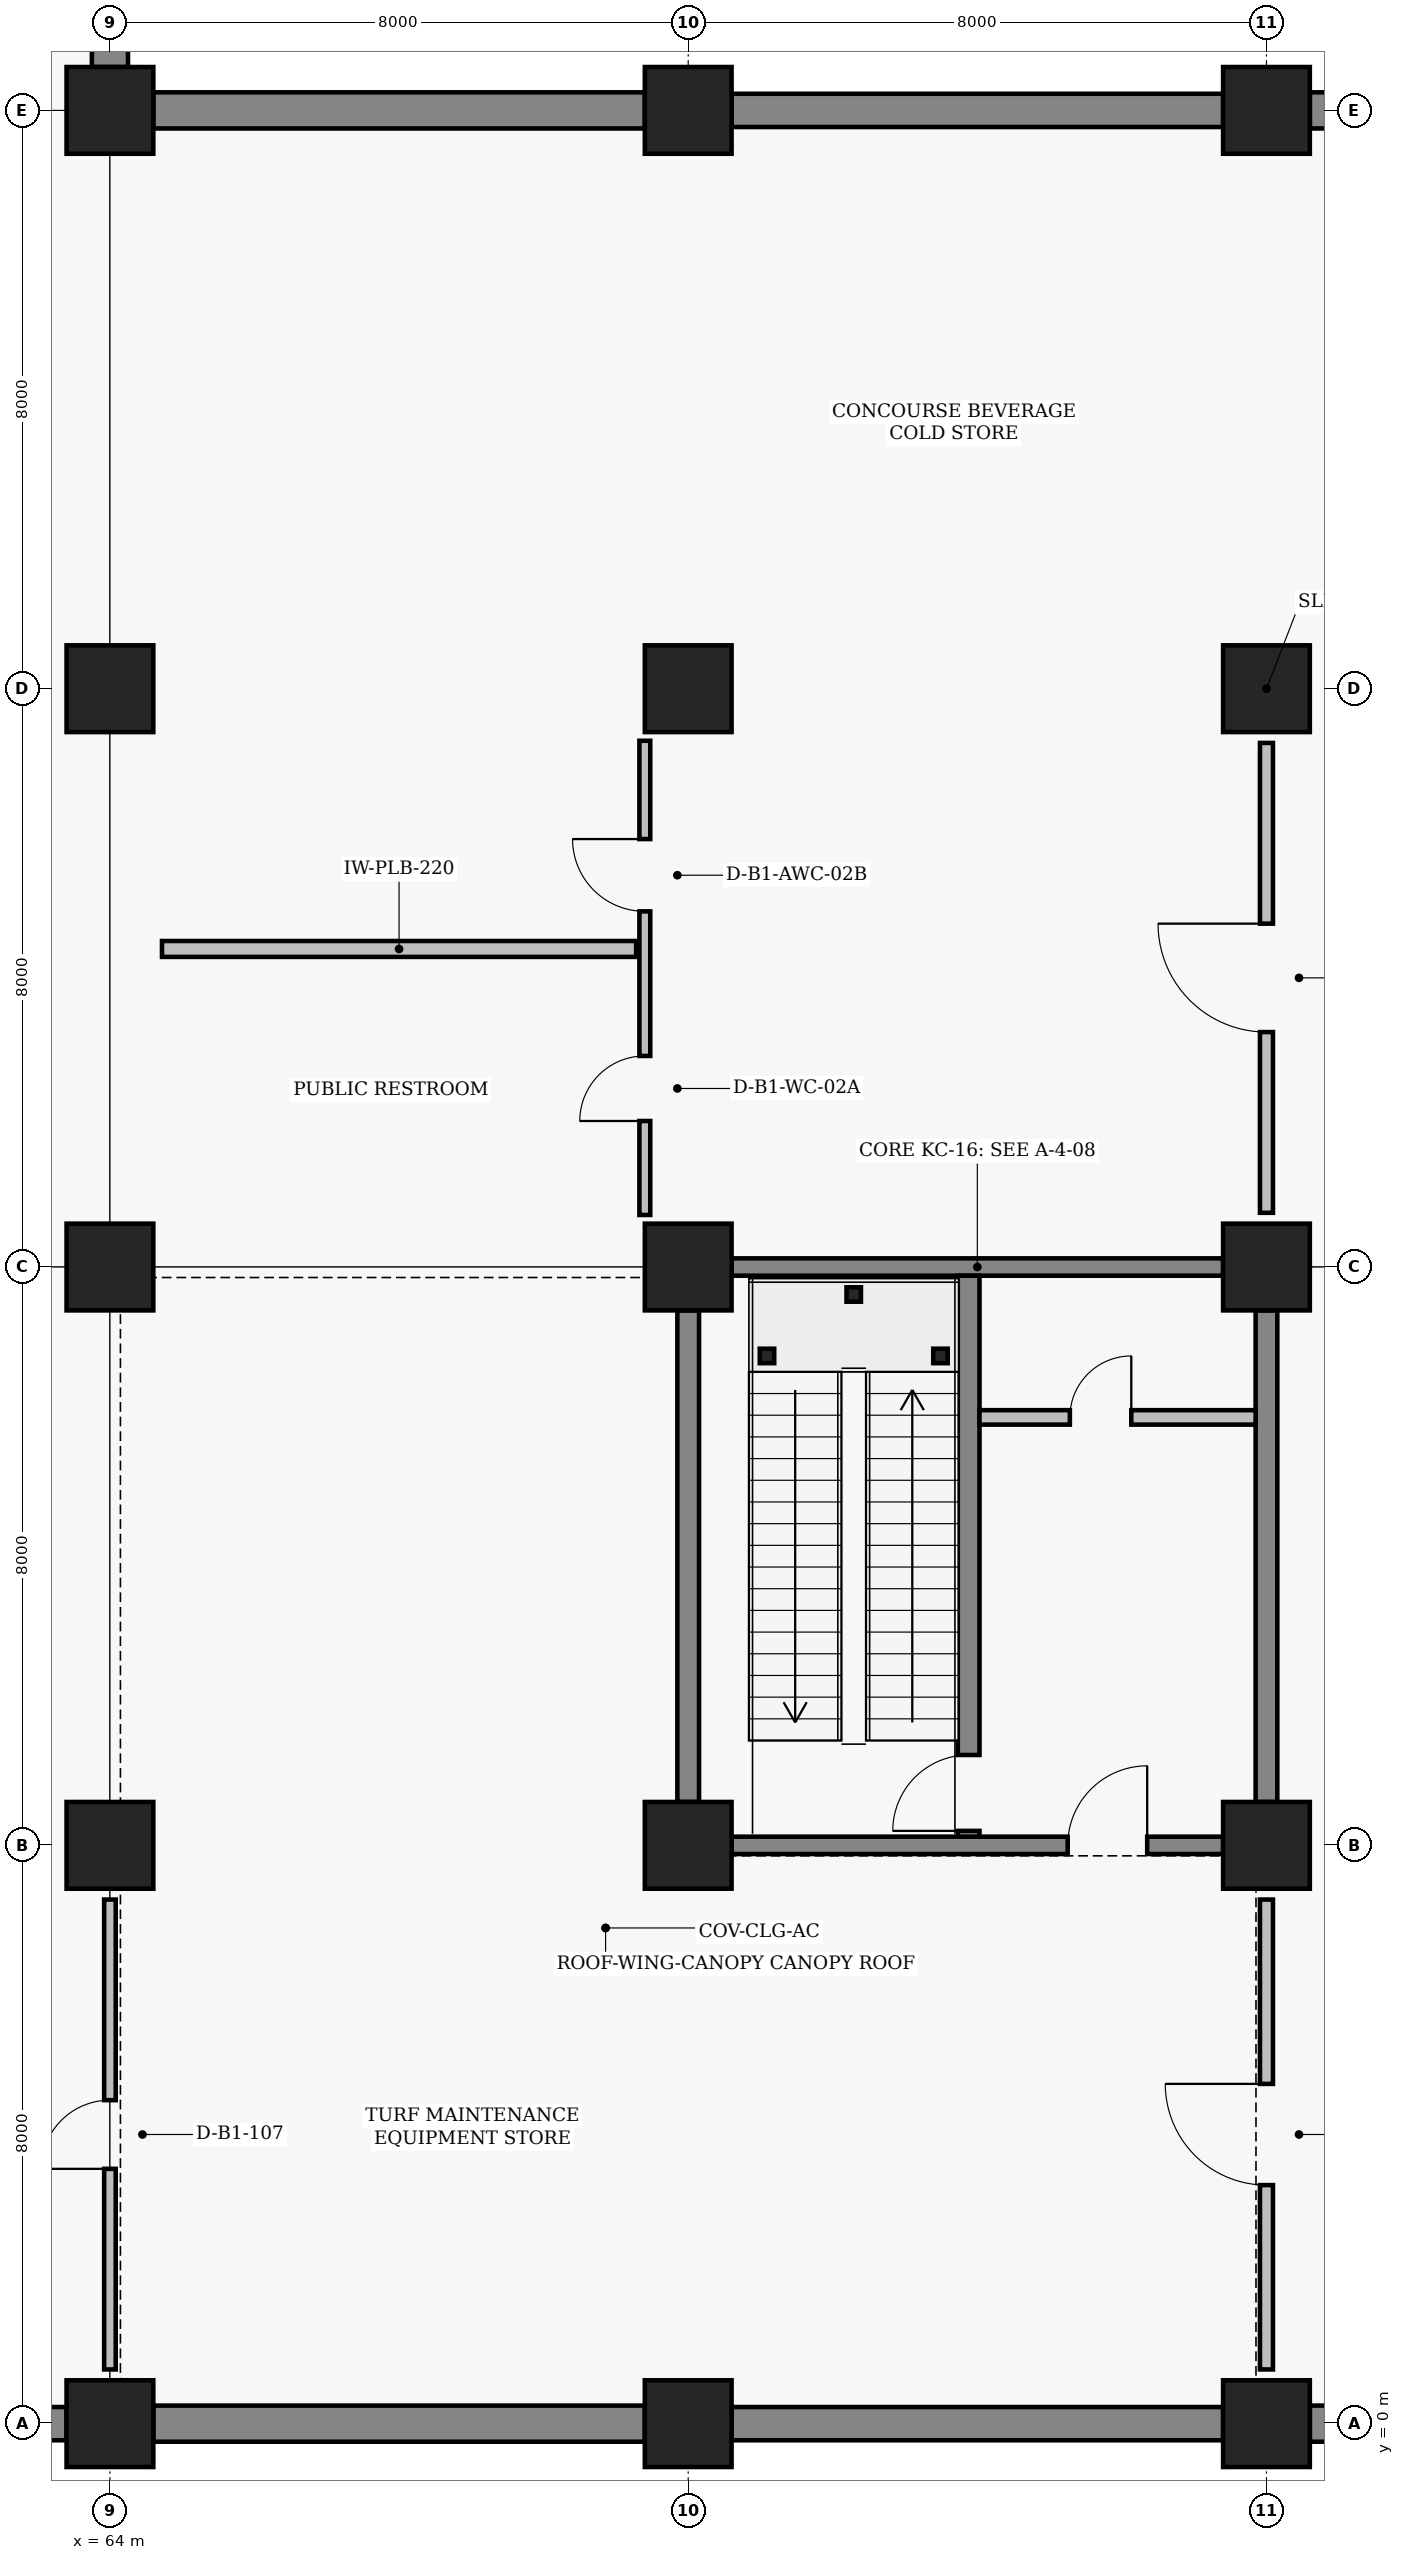
"""IFC4 building model, lengths in metres.
Left out: names, types, materials, properties, quantities, classifications, styles, units other than length and angle.
Written with IfcOpenShell. Run it as: python <this file> out.ifc"""

import sys

from ifc_helpers import new_model, si_unit, direction, frame, frame_2d, origin, origin_2d, place, context, subcontext, project, spatial, rectangle, hollow_rectangle, extrude, element, fill, save


model = new_model("IFC4")
c1 = context("Model", 3, precision=1e-05, world=origin(), true_north=direction((0.0, 1.0)))
c2 = subcontext(c1, "Body", "Model", "MODEL_VIEW")
j1 = project(units=[si_unit("LENGTHUNIT", "METRE"), si_unit("PLANEANGLEUNIT", "RADIAN")], contexts=[c1])
p1 = place(None, origin())
s1 = spatial("IfcSite", under=j1, at=p1, CompositionType="ELEMENT")
p2 = place(p1, origin())
s2 = spatial("IfcBuilding", under=s1, at=p2, CompositionType="ELEMENT")
p3 = place(p2, frame((0.0, 0.0, -5.4)))
s3 = spatial("IfcBuildingStorey", under=s2, at=p3, CompositionType="ELEMENT", Elevation=-5.4)
for number, where, z_axis, x_axis in (
    (1, (64.0, 0.0, 0.0), (0.0, 0.0, 1.0), (1.0, 0.0, 0.0)),
    (2, (64.0, 8.0, 0.0), (0.0, 0.0, 1.0), (1.0, 0.0, 0.0)),
    (3, (64.0, 16.0, 0.0), (0.0, 0.0, 1.0), (1.0, 0.0, 0.0)),
    (4, (64.0, 24.0, 0.0), (0.0, 0.0, 1.0), (1.0, 0.0, 0.0)),
    (5, (64.0, 32.0, 0.0), (0.0, 0.0, 1.0), (1.0, 0.0, 0.0)),
    (6, (72.0, 0.0, 0.0), (0.0, 0.0, 1.0), (1.0, 0.0, 0.0)),
    (7, (72.0, 8.0, 0.0), (0.0, 0.0, 1.0), (1.0, 0.0, 0.0)),
    (8, (72.0, 16.0, 0.0), (0.0, 0.0, 1.0), (1.0, 0.0, 0.0)),
    (9, (72.0, 24.0, 0.0), (0.0, 0.0, 1.0), (1.0, 0.0, 0.0)),
    (10, (72.0, 32.0, 0.0), (0.0, 0.0, 1.0), (1.0, 0.0, 0.0)),
    (11, (80.0, 0.0, 0.0), (0.0, 0.0, 1.0), (1.0, 0.0, 0.0)),
    (12, (80.0, 8.0, 0.0), (0.0, 0.0, 1.0), (1.0, 0.0, 0.0)),
    (13, (80.0, 16.0, 0.0), (0.0, 0.0, 1.0), (1.0, 0.0, 0.0)),
    (14, (80.0, 24.0, 0.0), (0.0, 0.0, 1.0), (1.0, 0.0, 0.0)),
    (15, (80.0, 32.0, 0.0), (0.0, 0.0, 1.0), (1.0, 0.0, 0.0)),
):
    element("IfcColumn", number, at=place(p3, frame(where, z_axis=z_axis, x_axis=x_axis)), inside=s3, PredefinedType="COLUMN", context=c2, shape_type="SweptSolid", body=[
        extrude(rectangle(XDim=1.2, YDim=1.2, at=origin_2d()), origin(), (0.0, 0.0, 1.0), 5.4),
    ])
p4 = place(p3, frame((56.6, 0.0, 0.0), z_axis=(0.0, 0.0, 1.0), x_axis=(1.0, 0.0, 0.0)))
e16 = element("IfcWall", 16, at=p4, inside=s3, PredefinedType="STANDARD", context=c2, shape_type="SweptSolid", body=[
    extrude(rectangle(XDim=6.8, YDim=0.46, at=frame_2d((3.4, 0.0))), origin(), (0.0, 0.0, 1.0), 4.29),
])
p5 = place(p3, frame((64.0, 32.6, 0.0), z_axis=(0.0, 0.0, 1.0), x_axis=(0.0, 1.0, 0.0)))
e17 = element("IfcWall", 17, at=p5, inside=s3, PredefinedType="STANDARD", context=c2, shape_type="SweptSolid", body=[
    extrude(rectangle(XDim=6.8, YDim=0.5, at=frame_2d((3.4, 0.0))), origin(), (0.0, 0.0, 1.0), 4.24),
])
p6 = place(p3, frame((64.6, 0.0, 0.0), z_axis=(0.0, 0.0, 1.0), x_axis=(1.0, 0.0, 0.0)))
e18 = element("IfcWall", 18, at=p6, inside=s3, PredefinedType="STANDARD", context=c2, shape_type="SweptSolid", body=[
    extrude(rectangle(XDim=6.8, YDim=0.5, at=frame_2d((3.4, 0.0))), origin(), (0.0, 0.0, 1.0), 4.29),
])
p7 = place(p3, frame((64.6, 32.0, 0.0), z_axis=(0.0, 0.0, 1.0), x_axis=(1.0, 0.0, 0.0)))
e19 = element("IfcWall", 19, at=p7, inside=s3, PredefinedType="STANDARD", context=c2, shape_type="SweptSolid", body=[
    extrude(rectangle(XDim=6.8, YDim=0.5, at=frame_2d((3.4, 0.0))), origin(), (0.0, 0.0, 1.0), 4.24),
])
p8 = place(p3, frame((72.6, 0.0, 0.0), z_axis=(0.0, 0.0, 1.0), x_axis=(1.0, 0.0, 0.0)))
e20 = element("IfcWall", 20, at=p8, inside=s3, PredefinedType="STANDARD", context=c2, shape_type="SweptSolid", body=[
    extrude(rectangle(XDim=6.8, YDim=0.46, at=frame_2d((3.4, 0.0))), origin(), (0.0, 0.0, 1.0), 4.29),
])
p9 = place(p3, frame((72.6, 32.0, 0.0), z_axis=(0.0, 0.0, 1.0), x_axis=(1.0, 0.0, 0.0)))
e21 = element("IfcWall", 21, at=p9, inside=s3, PredefinedType="STANDARD", context=c2, shape_type="SweptSolid", body=[
    extrude(rectangle(XDim=6.8, YDim=0.46, at=frame_2d((3.4, 0.0))), origin(), (0.0, 0.0, 1.0), 4.34),
])
p10 = place(p3, frame((80.6, 0.0, 0.0), z_axis=(0.0, 0.0, 1.0), x_axis=(1.0, 0.0, 0.0)))
e22 = element("IfcWall", 22, at=p10, inside=s3, PredefinedType="STANDARD", context=c2, shape_type="SweptSolid", body=[
    extrude(rectangle(XDim=6.8, YDim=0.5, at=frame_2d((3.4, 0.0))), origin(), (0.0, 0.0, 1.0), 4.29),
])
p11 = place(p3, frame((80.6, 32.0, 0.0), z_axis=(0.0, 0.0, 1.0), x_axis=(1.0, 0.0, 0.0)))
e23 = element("IfcWall", 23, at=p11, inside=s3, PredefinedType="STANDARD", context=c2, shape_type="SweptSolid", body=[
    extrude(rectangle(XDim=6.8, YDim=0.5, at=frame_2d((3.4, 0.0))), origin(), (0.0, 0.0, 1.0), 4.34),
])
p12 = place(p3, frame((72.6, 8.0, 0.0), z_axis=(0.0, 0.0, 1.0), x_axis=(1.0, 0.0, 0.0)))
e24 = element("IfcWall", 24, at=p12, inside=s3, PredefinedType="SHEAR", context=c2, shape_type="SweptSolid", body=[
    extrude(rectangle(XDim=6.8, YDim=0.24, at=frame_2d((3.4, 0.0))), origin(), (0.0, 0.0, 1.0), 4.54),
])
p13 = place(p12, frame((4.65, 0.0, 0.0)))
e25 = element("IfcOpeningElement", 25, at=p13, cuts=e24, PredefinedType="OPENING", context=c2, shape_type="SweptSolid", body=[
    extrude(rectangle(XDim=1.1, YDim=2.2, at=frame_2d((0.55, 1.1))), frame((0.0, 0.13, 0.0), z_axis=(0.0, -1.0, 0.0), x_axis=(1.0, 0.0, 0.0)), (0.0, 0.0, 1.0), 0.26),
])
p14 = place(p3, frame((72.6, 16.0, 0.0), z_axis=(0.0, 0.0, 1.0), x_axis=(1.0, 0.0, 0.0)))
e26 = element("IfcWall", 26, at=p14, inside=s3, PredefinedType="SHEAR", context=c2, shape_type="SweptSolid", body=[
    extrude(rectangle(XDim=6.8, YDim=0.24, at=frame_2d((3.4, 0.0))), origin(), (0.0, 0.0, 1.0), 4.54),
])
for number, where, z_axis, x_axis in (
    (27, (72.0, 8.6, 0.0), (0.0, 0.0, 1.0), (0.0, 1.0, 0.0)),
    (28, (80.0, 8.6, 0.0), (0.0, 0.0, 1.0), (0.0, 1.0, 0.0)),
):
    element("IfcWall", number, at=place(p3, frame(where, z_axis=z_axis, x_axis=x_axis)), inside=s3, PredefinedType="SHEAR", context=c2, shape_type="SweptSolid", body=[
        extrude(rectangle(XDim=6.8, YDim=0.3, at=frame_2d((3.4, 0.0))), origin(), (0.0, 0.0, 1.0), 4.34),
    ])
p15 = place(p3, frame((75.88, 8.12, 0.0), z_axis=(0.0, 0.0, 1.0), x_axis=(0.0, 1.0, 0.0)))
e29 = element("IfcWall", 29, at=p15, inside=s3, PredefinedType="SHEAR", context=c2, shape_type="SweptSolid", body=[
    extrude(rectangle(XDim=7.76, YDim=0.3, at=frame_2d((3.88, 0.0))), origin(), (0.0, 0.0, 1.0), 4.54),
])
p16 = place(p15, frame((0.08, 0.0, 0.0)))
e30 = element("IfcOpeningElement", 30, at=p16, cuts=e29, PredefinedType="OPENING", context=c2, shape_type="SweptSolid", body=[
    extrude(rectangle(XDim=1.05, YDim=2.15, at=frame_2d((0.525, 1.075))), frame((0.0, 0.16, 0.0), z_axis=(0.0, -1.0, 0.0), x_axis=(1.0, 0.0, 0.0)), (0.0, 0.0, 1.0), 0.32),
])
p17 = place(p3, frame((76.03, 13.92, 0.0), z_axis=(0.0, 0.0, 1.0), x_axis=(1.0, 0.0, 0.0)))
e31 = element("IfcWall", 31, at=p17, inside=s3, PredefinedType="PARTITIONING", context=c2, shape_type="SweptSolid", body=[
    extrude(rectangle(XDim=3.82, YDim=0.2, at=frame_2d((1.91, 0.0))), origin(), (0.0, 0.0, 1.0), 4.34),
])
p18 = place(p17, frame((1.25, 0.0, 0.0)))
e32 = element("IfcOpeningElement", 32, at=p18, cuts=e31, PredefinedType="OPENING", context=c2, shape_type="SweptSolid", body=[
    extrude(rectangle(XDim=0.85, YDim=2.05, at=frame_2d((0.425, 1.025))), frame((0.0, 0.11, 0.0), z_axis=(0.0, -1.0, 0.0), x_axis=(1.0, 0.0, 0.0)), (0.0, 0.0, 1.0), 0.22),
])
for number, where, z_axis, x_axis in (
    (33, (73.09, 14.77, 0.0), (0.0, 0.0, 1.0), (1.0, 0.0, 0.0)),
    (34, (75.49, 14.77, 0.0), (0.0, 0.0, 1.0), (1.0, 0.0, 0.0)),
    (35, (74.29, 15.62, 0.0), (0.0, 0.0, 1.0), (1.0, 0.0, 0.0)),
):
    element("IfcColumn", number, at=place(p3, frame(where, z_axis=z_axis, x_axis=x_axis)), inside=s3, PredefinedType="COLUMN", context=c2, shape_type="SweptSolid", body=[
        extrude(hollow_rectangle(XDim=0.2, YDim=0.2, WallThickness=0.009, at=origin_2d()), origin(), (0.0, 0.0, 1.0), 2.5),
    ])
p19 = place(p3, frame((64.72, 20.4, 0.0), z_axis=(0.0, 0.0, 1.0), x_axis=(1.0, 0.0, 0.0)))
e36 = element("IfcWall", 36, at=p19, inside=s3, PredefinedType="PLUMBINGWALL", context=c2, shape_type="SweptSolid", body=[
    extrude(rectangle(XDim=6.56, YDim=0.22, at=frame_2d((3.28, 0.0))), origin(), (0.0, 0.0, 1.0), 4.69),
])
p20 = place(p3, frame((71.4, 16.72, 0.0), z_axis=(0.0, 0.0, 1.0), x_axis=(0.0, 1.0, 0.0)))
e37 = element("IfcWall", 37, at=p20, inside=s3, PredefinedType="PARTITIONING", context=c2, shape_type="SweptSolid", body=[
    extrude(rectangle(XDim=6.56, YDim=0.15, at=frame_2d((3.28, 0.0))), origin(), (0.0, 0.0, 1.0), 4.69),
])
p21 = place(p20, frame((1.3, 0.0, 0.0)))
e38 = element("IfcOpeningElement", 38, at=p21, cuts=e37, PredefinedType="OPENING", context=c2, shape_type="SweptSolid", body=[
    extrude(rectangle(XDim=0.9, YDim=2.1, at=frame_2d((0.45, 1.05))), frame((0.0, 0.085, 0.0), z_axis=(0.0, -1.0, 0.0), x_axis=(1.0, 0.0, 0.0)), (0.0, 0.0, 1.0), 0.17),
])
p22 = place(p20, frame((4.2, 0.0, 0.0)))
e39 = element("IfcOpeningElement", 39, at=p22, cuts=e37, PredefinedType="OPENING", context=c2, shape_type="SweptSolid", body=[
    extrude(rectangle(XDim=1.0, YDim=2.15, at=frame_2d((0.5, 1.075))), frame((0.0, 0.085, 0.0), z_axis=(0.0, -1.0, 0.0), x_axis=(1.0, 0.0, 0.0)), (0.0, 0.0, 1.0), 0.17),
])
p23 = place(p3, frame((80.0, 16.75, 0.0), z_axis=(0.0, 0.0, 1.0), x_axis=(0.0, 1.0, 0.0)))
e40 = element("IfcWall", 40, at=p23, inside=s3, PredefinedType="PARTITIONING", context=c2, shape_type="SweptSolid", body=[
    extrude(rectangle(XDim=6.5, YDim=0.18, at=frame_2d((3.25, 0.0))), origin(), (0.0, 0.0, 1.0), 4.39),
])
p24 = place(p23, frame((2.5, 0.0, 0.0)))
e41 = element("IfcOpeningElement", 41, at=p24, cuts=e40, PredefinedType="OPENING", context=c2, shape_type="SweptSolid", body=[
    extrude(rectangle(XDim=1.5, YDim=2.2, at=frame_2d((0.75, 1.1))), frame((0.0, 0.1, 0.0), z_axis=(0.0, -1.0, 0.0), x_axis=(1.0, 0.0, 0.0)), (0.0, 0.0, 1.0), 0.2),
])
p25 = place(p3, frame((64.0, 0.75, 0.0), z_axis=(0.0, 0.0, 1.0), x_axis=(0.0, 1.0, 0.0)))
e42 = element("IfcWall", 42, at=p25, inside=s3, PredefinedType="PARTITIONING", context=c2, shape_type="SweptSolid", body=[
    extrude(rectangle(XDim=6.5, YDim=0.16, at=frame_2d((3.25, 0.0))), origin(), (0.0, 0.0, 1.0), 4.34),
])
p26 = place(p25, frame((2.775, 0.0, 0.0)))
e43 = element("IfcOpeningElement", 43, at=p26, cuts=e42, PredefinedType="OPENING", context=c2, shape_type="SweptSolid", body=[
    extrude(rectangle(XDim=0.95, YDim=2.1, at=frame_2d((0.475, 1.05))), frame((0.0, 0.09, 0.0), z_axis=(0.0, -1.0, 0.0), x_axis=(1.0, 0.0, 0.0)), (0.0, 0.0, 1.0), 0.18),
])
p27 = place(p3, frame((80.0, 0.75, 0.0), z_axis=(0.0, 0.0, 1.0), x_axis=(0.0, 1.0, 0.0)))
e44 = element("IfcWall", 44, at=p27, inside=s3, PredefinedType="PARTITIONING", context=c2, shape_type="SweptSolid", body=[
    extrude(rectangle(XDim=6.5, YDim=0.18, at=frame_2d((3.25, 0.0))), origin(), (0.0, 0.0, 1.0), 4.34),
])
p28 = place(p27, frame((2.55, 0.0, 0.0)))
e45 = element("IfcOpeningElement", 45, at=p28, cuts=e44, PredefinedType="OPENING", context=c2, shape_type="SweptSolid", body=[
    extrude(rectangle(XDim=1.4, YDim=2.2, at=frame_2d((0.7, 1.1))), frame((0.0, 0.1, 0.0), z_axis=(0.0, -1.0, 0.0), x_axis=(1.0, 0.0, 0.0)), (0.0, 0.0, 1.0), 0.2),
])
p29 = place(p13, origin())
e46 = element("IfcDoor", 46, at=p29, inside=s3, OperationType="SINGLE_SWING_RIGHT", PredefinedType="DOOR", context=c2, shape_type="SweptSolid", body=[
    extrude(rectangle(XDim=1.1, YDim=2.2, at=frame_2d((0.55, 1.1))), frame((0.0, 0.025, 0.0), z_axis=(0.0, -1.0, 0.0), x_axis=(1.0, 0.0, 0.0)), (0.0, 0.0, 1.0), 0.05),
])
fill(e25, e46)
p30 = place(p16, origin())
e47 = element("IfcDoor", 47, at=p30, inside=s3, OperationType="SINGLE_SWING_LEFT", PredefinedType="DOOR", context=c2, shape_type="SweptSolid", body=[
    extrude(rectangle(XDim=1.05, YDim=2.15, at=frame_2d((0.525, 1.075))), frame((0.0, 0.025, 0.0), z_axis=(0.0, -1.0, 0.0), x_axis=(1.0, 0.0, 0.0)), (0.0, 0.0, 1.0), 0.05),
])
fill(e30, e47)
p31 = place(p18, origin())
e48 = element("IfcDoor", 48, at=p31, inside=s3, OperationType="SINGLE_SWING_RIGHT", PredefinedType="TRAPDOOR", context=c2, shape_type="SweptSolid", body=[
    extrude(rectangle(XDim=0.85, YDim=2.05, at=frame_2d((0.425, 1.025))), frame((0.0, 0.025, 0.0), z_axis=(0.0, -1.0, 0.0), x_axis=(1.0, 0.0, 0.0)), (0.0, 0.0, 1.0), 0.05),
])
fill(e32, e48)
p32 = place(p21, origin())
e49 = element("IfcDoor", 49, at=p32, inside=s3, OperationType="SINGLE_SWING_LEFT", PredefinedType="DOOR", context=c2, shape_type="SweptSolid", body=[
    extrude(rectangle(XDim=0.9, YDim=2.1, at=frame_2d((0.45, 1.05))), frame((0.0, 0.025, 0.0), z_axis=(0.0, -1.0, 0.0), x_axis=(1.0, 0.0, 0.0)), (0.0, 0.0, 1.0), 0.05),
])
fill(e38, e49)
p33 = place(p22, origin())
e50 = element("IfcDoor", 50, at=p33, inside=s3, OperationType="SINGLE_SWING_RIGHT", PredefinedType="DOOR", context=c2, shape_type="SweptSolid", body=[
    extrude(rectangle(XDim=1.0, YDim=2.15, at=frame_2d((0.5, 1.075))), frame((0.0, 0.025, 0.0), z_axis=(0.0, -1.0, 0.0), x_axis=(1.0, 0.0, 0.0)), (0.0, 0.0, 1.0), 0.05),
])
fill(e39, e50)
p34 = place(p24, origin())
e51 = element("IfcDoor", 51, at=p34, inside=s3, OperationType="SINGLE_SWING_RIGHT", PredefinedType="DOOR", context=c2, shape_type="SweptSolid", body=[
    extrude(rectangle(XDim=1.5, YDim=2.2, at=frame_2d((0.75, 1.1))), frame((0.0, 0.025, 0.0), z_axis=(0.0, -1.0, 0.0), x_axis=(1.0, 0.0, 0.0)), (0.0, 0.0, 1.0), 0.05),
])
fill(e41, e51)
p35 = place(p26, origin())
e52 = element("IfcDoor", 52, at=p35, inside=s3, OperationType="SINGLE_SWING_LEFT", PredefinedType="DOOR", context=c2, shape_type="SweptSolid", body=[
    extrude(rectangle(XDim=0.95, YDim=2.1, at=frame_2d((0.475, 1.05))), frame((0.0, 0.025, 0.0), z_axis=(0.0, -1.0, 0.0), x_axis=(1.0, 0.0, 0.0)), (0.0, 0.0, 1.0), 0.05),
])
fill(e43, e52)
p36 = place(p28, origin())
e53 = element("IfcDoor", 53, at=p36, inside=s3, OperationType="SINGLE_SWING_RIGHT", PredefinedType="DOOR", context=c2, shape_type="SweptSolid", body=[
    extrude(rectangle(XDim=1.4, YDim=2.2, at=frame_2d((0.7, 1.1))), frame((0.0, 0.025, 0.0), z_axis=(0.0, -1.0, 0.0), x_axis=(1.0, 0.0, 0.0)), (0.0, 0.0, 1.0), 0.05),
])
fill(e45, e53)
save(model, sys.argv[1])
